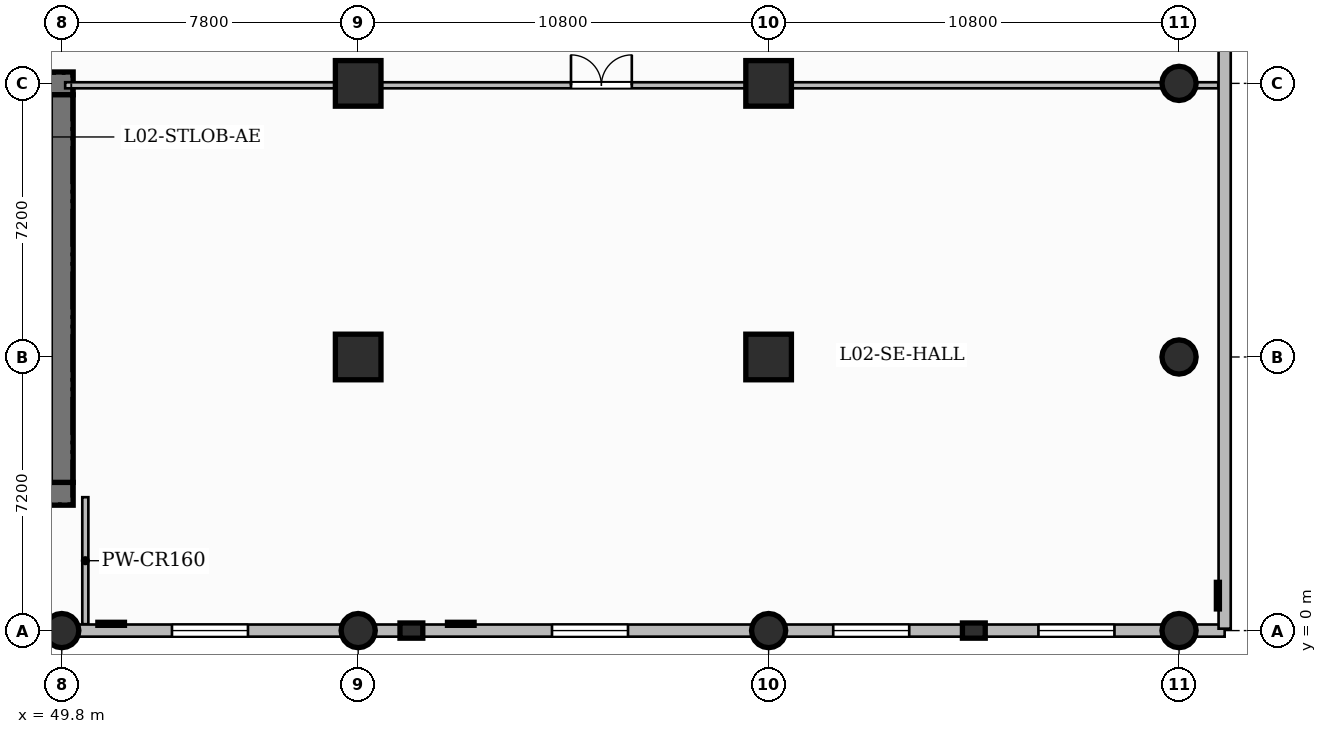
"""IFC4 building model, lengths in metres.
Left out: names, types, materials, properties, quantities, classifications, styles, units other than length and angle.
Written with IfcOpenShell. Run it as: python <this file> out.ifc"""

import sys

from ifc_helpers import new_model, si_unit, direction, frame, frame_2d, origin, origin_2d, place, context, subcontext, project, spatial, rectangle, circle, extrude, source, transform, mapped, element, fill, save


model = new_model("IFC4")
c1 = context("Model", 3, precision=1e-05, world=origin(), true_north=direction((0.0, 1.0)))
c2 = subcontext(c1, "Body", "Model", "MODEL_VIEW")
j1 = project(units=[si_unit("LENGTHUNIT", "METRE"), si_unit("PLANEANGLEUNIT", "RADIAN")], contexts=[c1])
p1 = place(None, origin())
s1 = spatial("IfcSite", under=j1, at=p1, CompositionType="ELEMENT")
p2 = place(p1, origin())
s2 = spatial("IfcBuilding", under=s1, at=p2, CompositionType="ELEMENT")
p3 = place(p2, frame((0.0, 0.0, 10.8)))
s3 = spatial("IfcBuildingStorey", under=s2, at=p3, CompositionType="ELEMENT", Elevation=10.8)
p4 = place(p3, frame((34.5, 3.6, 0.0), z_axis=(0.0, 0.0, 1.0), x_axis=(1.0, 0.0, 0.0)))
e1 = element("IfcWall", 1, at=p4, inside=s3, PredefinedType="SHEAR", context=c2, shape_type="SweptSolid", body=[
    extrude(rectangle(XDim=15.6, YDim=0.6, at=frame_2d((7.8, 0.0))), origin(), (0.0, 0.0, 1.0), 5.4),
])
p5 = place(p4, frame((4.5, 0.0, 0.0)))
e2 = element("IfcOpeningElement", 2, at=p5, cuts=e1, PredefinedType="OPENING", context=c2, shape_type="SweptSolid", body=[
    extrude(rectangle(XDim=0.9, YDim=2.1, at=frame_2d((0.45, 1.05))), frame((0.0, 0.31, 0.0), z_axis=(0.0, -1.0, 0.0), x_axis=(1.0, 0.0, 0.0)), (0.0, 0.0, 1.0), 0.62),
])
p6 = place(p4, frame((6.95, 0.0, 0.0)))
e3 = element("IfcOpeningElement", 3, at=p6, cuts=e1, PredefinedType="OPENING", context=c2, shape_type="SweptSolid", body=[
    extrude(rectangle(XDim=0.9, YDim=2.1, at=frame_2d((0.45, 1.05))), frame((0.0, 0.31, 0.0), z_axis=(0.0, -1.0, 0.0), x_axis=(1.0, 0.0, 0.0)), (0.0, 0.0, 1.0), 0.62),
])
p7 = place(p3, frame((34.5, 14.4, 0.0), z_axis=(0.0, 0.0, 1.0), x_axis=(1.0, 0.0, 0.0)))
e4 = element("IfcWall", 4, at=p7, inside=s3, PredefinedType="SHEAR", context=c2, shape_type="SweptSolid", body=[
    extrude(rectangle(XDim=15.6, YDim=0.6, at=frame_2d((7.8, 0.0))), origin(), (0.0, 0.0, 1.0), 5.4),
])
p8 = place(p7, frame((5.43, 0.0, 0.0)))
e5 = element("IfcOpeningElement", 5, at=p8, cuts=e4, PredefinedType="OPENING", context=c2, shape_type="SweptSolid", body=[
    extrude(rectangle(XDim=1.5, YDim=2.2, at=frame_2d((0.75, 1.1))), frame((0.0, 0.31, 0.0), z_axis=(0.0, -1.0, 0.0), x_axis=(1.0, 0.0, 0.0)), (0.0, 0.0, 1.0), 0.62),
])
p9 = place(p7, frame((1.645, 0.0, 0.0)))
e6 = element("IfcOpeningElement", 6, at=p9, cuts=e4, PredefinedType="OPENING", context=c2, shape_type="SweptSolid", body=[
    extrude(rectangle(XDim=1.05, YDim=2.15, at=frame_2d((0.525, 1.075))), frame((0.0, 0.31, 0.0), z_axis=(0.0, -1.0, 0.0), x_axis=(1.0, 0.0, 0.0)), (0.0, 0.0, 1.0), 0.62),
])
p10 = place(p7, frame((11.275, 0.0, 0.0)))
e7 = element("IfcOpeningElement", 7, at=p10, cuts=e4, PredefinedType="OPENING", context=c2, shape_type="SweptSolid", body=[
    extrude(rectangle(XDim=1.05, YDim=2.15, at=frame_2d((0.525, 1.075))), frame((0.0, 0.31, 0.0), z_axis=(0.0, -1.0, 0.0), x_axis=(1.0, 0.0, 0.0)), (0.0, 0.0, 1.0), 0.62),
])
p11 = place(p3, frame((49.8, 3.9, 0.0), z_axis=(0.0, 0.0, 1.0), x_axis=(0.0, 1.0, 0.0)))
e8 = element("IfcWall", 8, at=p11, inside=s3, PredefinedType="SHEAR", context=c2, shape_type="SweptSolid", body=[
    extrude(rectangle(XDim=10.2, YDim=0.6, at=frame_2d((5.1, 0.0))), origin(), (0.0, 0.0, 1.0), 5.4),
])
m1 = source(origin(), c2, "Body", "SweptSolid", [
    extrude(circle(Radius=0.45, at=origin_2d()), origin(), (0.0, 0.0, 1.0), 5.4),
])
for number, where, z_axis, x_axis in (
    (9, (49.8, 0.0, 0.0), (0.0, 0.0, 1.0), (1.0, 0.0, 0.0)),
    (10, (57.6, 0.0, 0.0), (0.0, 0.0, 1.0), (1.0, 0.0, 0.0)),
):
    element("IfcColumn", number, at=place(p3, frame(where, z_axis=z_axis, x_axis=x_axis)), inside=s3, PredefinedType="COLUMN", context=c2, shape_type="MappedRepresentation", body=[
        mapped(m1, transform((0.0, 0.0, 0.0), scale=1.0)),
    ])
m2 = source(origin(), c2, "Body", "SweptSolid", [
    extrude(rectangle(XDim=1.2, YDim=1.2, at=origin_2d()), origin(), (0.0, 0.0, 1.0), 5.4),
])
for number, where, z_axis, x_axis in (
    (11, (57.6, 7.2, 0.0), (0.0, 0.0, 1.0), (1.0, 0.0, 0.0)),
    (12, (57.6, 14.4, 0.0), (0.0, 0.0, 1.0), (1.0, 0.0, 0.0)),
):
    element("IfcColumn", number, at=place(p3, frame(where, z_axis=z_axis, x_axis=x_axis)), inside=s3, PredefinedType="COLUMN", context=c2, shape_type="MappedRepresentation", body=[
        mapped(m2, transform((0.0, 0.0, 0.0), scale=1.0)),
    ])
p12 = place(p3, frame((68.4, 0.0, 0.0), z_axis=(0.0, 0.0, 1.0), x_axis=(1.0, 0.0, 0.0)))
e13 = element("IfcColumn", 13, at=p12, inside=s3, PredefinedType="COLUMN", context=c2, shape_type="MappedRepresentation", body=[
    mapped(m1, transform((0.0, 0.0, 0.0), scale=1.0)),
])
for number, where, z_axis, x_axis in (
    (14, (68.4, 7.2, 0.0), (0.0, 0.0, 1.0), (1.0, 0.0, 0.0)),
    (15, (68.4, 14.4, 0.0), (0.0, 0.0, 1.0), (1.0, 0.0, 0.0)),
):
    element("IfcColumn", number, at=place(p3, frame(where, z_axis=z_axis, x_axis=x_axis)), inside=s3, PredefinedType="COLUMN", context=c2, shape_type="MappedRepresentation", body=[
        mapped(m2, transform((0.0, 0.0, 0.0), scale=1.0)),
    ])
for number, where, z_axis, x_axis in (
    (16, (79.2, 0.0, 0.0), (0.0, 0.0, 1.0), (1.0, 0.0, 0.0)),
    (17, (79.2, 7.2, 0.0), (0.0, 0.0, 1.0), (1.0, 0.0, 0.0)),
    (18, (79.2, 14.4, 0.0), (0.0, 0.0, 1.0), (1.0, 0.0, 0.0)),
):
    element("IfcColumn", number, at=place(p3, frame(where, z_axis=z_axis, x_axis=x_axis)), inside=s3, PredefinedType="COLUMN", context=c2, shape_type="MappedRepresentation", body=[
        mapped(m1, transform((0.0, 0.0, 0.0), scale=1.0)),
    ])
m3 = source(origin(), c2, "Body", "SweptSolid", [
    extrude(rectangle(XDim=0.6, YDim=0.4, at=origin_2d()), origin(), (0.0, 0.0, 1.0), 5.4),
])
for number, where, z_axis, x_axis in (
    (19, (59.0, 0.0, 0.0), (0.0, 0.0, 1.0), (1.0, 0.0, 0.0)),
    (20, (73.8, 0.0, 0.0), (0.0, 0.0, 1.0), (1.0, 0.0, 0.0)),
):
    element("IfcColumn", number, at=place(p3, frame(where, z_axis=z_axis, x_axis=x_axis)), inside=s3, PredefinedType="PILASTER", context=c2, shape_type="MappedRepresentation", body=[
        mapped(m3, transform((0.0, 0.0, 0.0), scale=1.0)),
    ])
p13 = place(p3, frame((49.89, 14.35, 0.0), z_axis=(0.0, 0.0, 1.0), x_axis=(1.0, 0.0, 0.0)))
e21 = element("IfcWall", 21, at=p13, inside=s3, PredefinedType="PARTITIONING", context=c2, shape_type="SweptSolid", body=[
    extrude(rectangle(XDim=30.342, YDim=0.16, at=frame_2d((15.171, 0.0))), origin(), (0.0, 0.0, 1.0), 4.185),
])
p14 = place(p13, frame((13.31, 0.0, 0.0)))
e22 = element("IfcOpeningElement", 22, at=p14, cuts=e21, PredefinedType="OPENING", context=c2, shape_type="SweptSolid", body=[
    extrude(rectangle(XDim=1.6, YDim=2.4, at=frame_2d((0.8, 1.2))), frame((0.0, 0.09, 0.0), z_axis=(0.0, -1.0, 0.0), x_axis=(1.0, 0.0, 0.0)), (0.0, 0.0, 1.0), 0.18),
])
p15 = place(p3, frame((50.42, 0.168, 0.0), z_axis=(0.0, 0.0, 1.0), x_axis=(0.0, 1.0, 0.0)))
e23 = element("IfcWall", 23, at=p15, inside=s3, PredefinedType="PARTITIONING", context=c2, shape_type="SweptSolid", body=[
    extrude(rectangle(XDim=3.342, YDim=0.16, at=frame_2d((1.671, 0.0))), origin(), (0.0, 0.0, 1.0), 5.1),
])
p16 = place(p3, frame((28.35, 0.0, 0.0), z_axis=(0.0, 0.0, 1.0), x_axis=(1.0, 0.0, 0.0)))
e24 = element("IfcWall", 24, at=p16, inside=s3, PredefinedType="SOLIDWALL", context=c2, shape_type="SweptSolid", body=[
    extrude(rectangle(XDim=52.05, YDim=0.32, at=frame_2d((26.025, 0.0))), origin(), (0.0, 0.0, 1.0), 4.185),
])
p17 = place(p16, frame((2.45, 0.0, 0.75)))
e25 = element("IfcOpeningElement", 25, at=p17, cuts=e24, PredefinedType="OPENING", context=c2, shape_type="SweptSolid", body=[
    extrude(rectangle(XDim=2.0, YDim=2.6, at=frame_2d((1.0, 1.3))), frame((0.0, 0.17, 0.0), z_axis=(0.0, -1.0, 0.0), x_axis=(1.0, 0.0, 0.0)), (0.0, 0.0, 1.0), 0.34),
])
p18 = place(p16, frame((9.05, 0.0, 0.75)))
e26 = element("IfcOpeningElement", 26, at=p18, cuts=e24, PredefinedType="OPENING", context=c2, shape_type="SweptSolid", body=[
    extrude(rectangle(XDim=2.0, YDim=2.6, at=frame_2d((1.0, 1.3))), frame((0.0, 0.17, 0.0), z_axis=(0.0, -1.0, 0.0), x_axis=(1.0, 0.0, 0.0)), (0.0, 0.0, 1.0), 0.34),
])
p19 = place(p16, frame((16.55, 0.0, 0.75)))
e27 = element("IfcOpeningElement", 27, at=p19, cuts=e24, PredefinedType="OPENING", context=c2, shape_type="SweptSolid", body=[
    extrude(rectangle(XDim=2.0, YDim=2.6, at=frame_2d((1.0, 1.3))), frame((0.0, 0.17, 0.0), z_axis=(0.0, -1.0, 0.0), x_axis=(1.0, 0.0, 0.0)), (0.0, 0.0, 1.0), 0.34),
])
p20 = place(p16, frame((24.35, 0.0, 0.75)))
e28 = element("IfcOpeningElement", 28, at=p20, cuts=e24, PredefinedType="OPENING", context=c2, shape_type="SweptSolid", body=[
    extrude(rectangle(XDim=2.0, YDim=2.6, at=frame_2d((1.0, 1.3))), frame((0.0, 0.17, 0.0), z_axis=(0.0, -1.0, 0.0), x_axis=(1.0, 0.0, 0.0)), (0.0, 0.0, 1.0), 0.34),
])
p21 = place(p16, frame((34.35, 0.0, 0.75)))
e29 = element("IfcOpeningElement", 29, at=p21, cuts=e24, PredefinedType="OPENING", context=c2, shape_type="SweptSolid", body=[
    extrude(rectangle(XDim=2.0, YDim=2.6, at=frame_2d((1.0, 1.3))), frame((0.0, 0.17, 0.0), z_axis=(0.0, -1.0, 0.0), x_axis=(1.0, 0.0, 0.0)), (0.0, 0.0, 1.0), 0.34),
])
p22 = place(p16, frame((41.75, 0.0, 0.75)))
e30 = element("IfcOpeningElement", 30, at=p22, cuts=e24, PredefinedType="OPENING", context=c2, shape_type="SweptSolid", body=[
    extrude(rectangle(XDim=2.0, YDim=2.6, at=frame_2d((1.0, 1.3))), frame((0.0, 0.17, 0.0), z_axis=(0.0, -1.0, 0.0), x_axis=(1.0, 0.0, 0.0)), (0.0, 0.0, 1.0), 0.34),
])
p23 = place(p16, frame((47.15, 0.0, 0.75)))
e31 = element("IfcOpeningElement", 31, at=p23, cuts=e24, PredefinedType="OPENING", context=c2, shape_type="SweptSolid", body=[
    extrude(rectangle(XDim=2.0, YDim=2.6, at=frame_2d((1.0, 1.3))), frame((0.0, 0.17, 0.0), z_axis=(0.0, -1.0, 0.0), x_axis=(1.0, 0.0, 0.0)), (0.0, 0.0, 1.0), 0.34),
])
p24 = place(p3, frame((80.4, 0.05, 0.0), z_axis=(0.0, 0.0, 1.0), x_axis=(0.0, 1.0, 0.0)))
e32 = element("IfcWall", 32, at=p24, inside=s3, PredefinedType="SOLIDWALL", context=c2, shape_type="SweptSolid", body=[
    extrude(rectangle(XDim=46.7, YDim=0.32, at=frame_2d((23.35, 0.0))), origin(), (0.0, 0.0, 1.0), 5.1),
])
p25 = place(p24, frame((22.35, 0.0, 0.75)))
e33 = element("IfcOpeningElement", 33, at=p25, cuts=e32, PredefinedType="OPENING", context=c2, shape_type="SweptSolid", body=[
    extrude(rectangle(XDim=2.0, YDim=2.6, at=frame_2d((1.0, 1.3))), frame((0.0, 0.17, 0.0), z_axis=(0.0, -1.0, 0.0), x_axis=(1.0, 0.0, 0.0)), (0.0, 0.0, 1.0), 0.34),
])
m4 = source(origin(), c2, "Body", "SweptSolid", [
    extrude(rectangle(XDim=1.6, YDim=2.4, at=frame_2d((0.8, 1.2))), frame((0.0, 0.025, 0.0), z_axis=(0.0, -1.0, 0.0), x_axis=(1.0, 0.0, 0.0)), (0.0, 0.0, 1.0), 0.05),
])
p26 = place(p14, origin())
e34 = element("IfcDoor", 34, at=p26, inside=s3, OperationType="DOUBLE_DOOR_SINGLE_SWING", PredefinedType="DOOR", context=c2, shape_type="MappedRepresentation", body=[
    mapped(m4, transform((0.0, 0.0, 0.0), scale=1.0)),
])
fill(e22, e34)
m5 = source(origin(), c2, "Body", "SweptSolid", [
    extrude(rectangle(XDim=2.0, YDim=2.6, at=frame_2d((1.0, 1.3))), frame((0.0, 0.03, 0.0), z_axis=(0.0, -1.0, 0.0), x_axis=(1.0, 0.0, 0.0)), (0.0, 0.0, 1.0), 0.06),
])
p27 = place(p20, origin())
e35 = element("IfcWindow", 35, at=p27, inside=s3, PartitioningType="DOUBLE_PANEL_VERTICAL", PredefinedType="WINDOW", context=c2, shape_type="MappedRepresentation", body=[
    mapped(m5, transform((0.0, 0.0, 0.0), scale=1.0)),
])
fill(e28, e35)
p28 = place(p21, origin())
e36 = element("IfcWindow", 36, at=p28, inside=s3, PartitioningType="DOUBLE_PANEL_VERTICAL", PredefinedType="WINDOW", context=c2, shape_type="MappedRepresentation", body=[
    mapped(m5, transform((0.0, 0.0, 0.0), scale=1.0)),
])
fill(e29, e36)
p29 = place(p22, origin())
e37 = element("IfcWindow", 37, at=p29, inside=s3, PartitioningType="DOUBLE_PANEL_VERTICAL", PredefinedType="WINDOW", context=c2, shape_type="MappedRepresentation", body=[
    mapped(m5, transform((0.0, 0.0, 0.0), scale=1.0)),
])
fill(e30, e37)
p30 = place(p23, origin())
e38 = element("IfcWindow", 38, at=p30, inside=s3, PartitioningType="DOUBLE_PANEL_VERTICAL", PredefinedType="WINDOW", context=c2, shape_type="MappedRepresentation", body=[
    mapped(m5, transform((0.0, 0.0, 0.0), scale=1.0)),
])
fill(e31, e38)
save(model, sys.argv[1])
